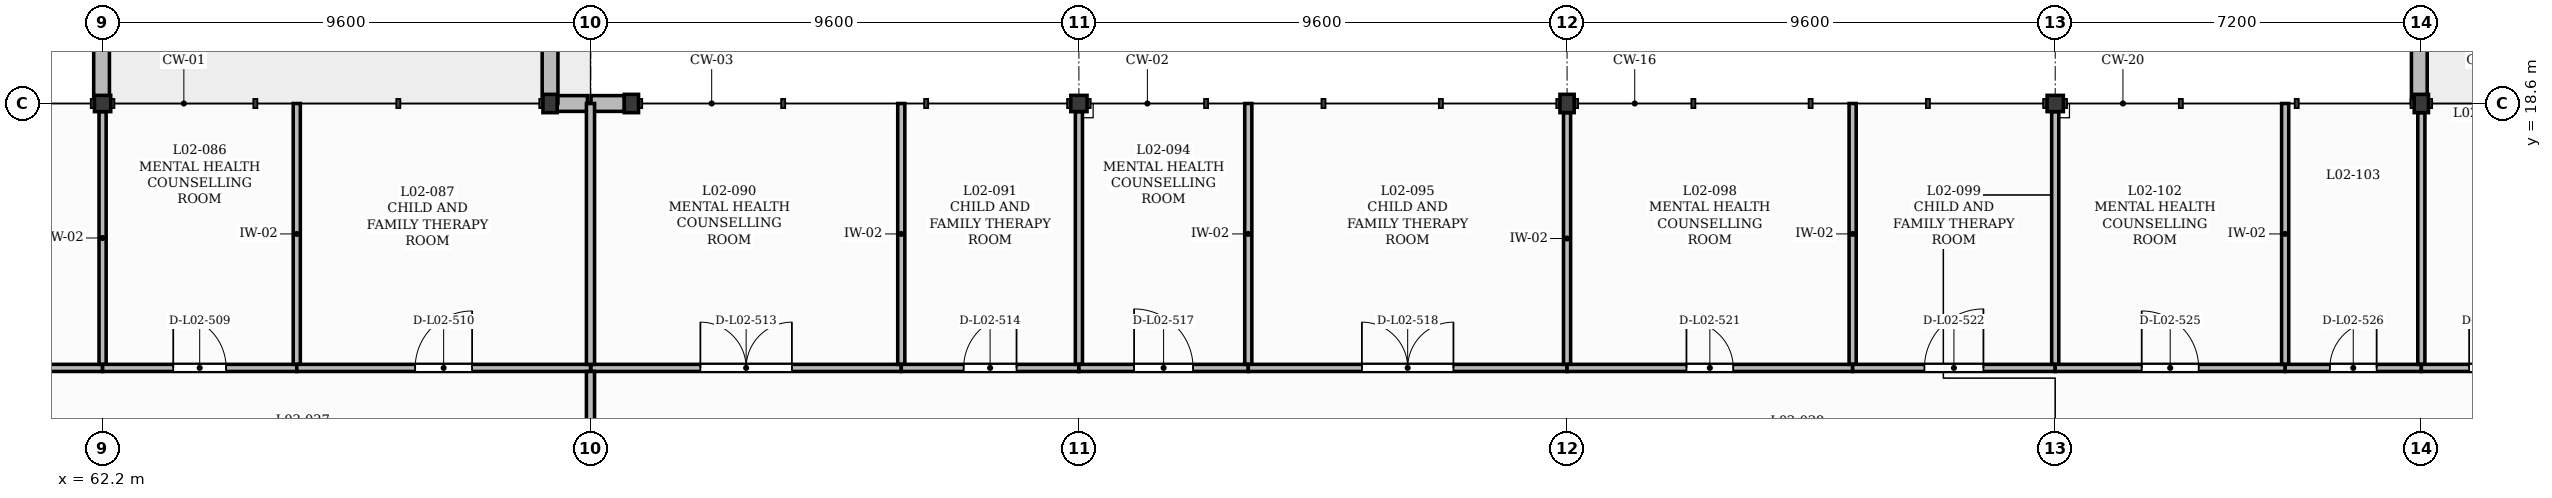
"""IFC4 building model, lengths in metres.
Left out: names, types, materials, properties, quantities, classifications, styles, units other than length and angle.
Written with IfcOpenShell. Run it as: python <this file> out.ifc"""

import sys

from ifc_helpers import new_model, si_unit, direction, frame, frame_2d, origin, origin_2d, place, context, subcontext, project, spatial, polyline, rectangle, outline, extrude, element, fill, save


model = new_model("IFC4")
c1 = context("Model", 3, precision=1e-05, world=origin(), true_north=direction((0.0, 1.0)))
c2 = subcontext(c1, "Body", "Model", "MODEL_VIEW")
j1 = project(units=[si_unit("LENGTHUNIT", "METRE"), si_unit("PLANEANGLEUNIT", "RADIAN")], contexts=[c1])
p1 = place(None, origin())
s1 = spatial("IfcSite", under=j1, at=p1, CompositionType="ELEMENT")
p2 = place(p1, origin())
s2 = spatial("IfcBuilding", under=s1, at=p2, CompositionType="ELEMENT")
p3 = place(p2, frame((0.0, 0.0, 9.0)))
s3 = spatial("IfcBuildingStorey", under=s2, at=p3, CompositionType="ELEMENT", Elevation=9.0)
p4 = place(p3, frame((72.6, 18.6, 0.0), z_axis=(0.0, 0.0, 1.0), x_axis=(1.0, 0.0, 0.0)))
e1 = element("IfcColumn", 1, at=p4, inside=s3, PredefinedType="COLUMN", context=c2, shape_type="SweptSolid", body=[
    extrude(rectangle(XDim=0.28, YDim=0.36, at=origin_2d()), origin(), (0.0, 0.0, 1.0), 3.99),
])
p5 = place(p3, frame((81.4, 18.6, 0.0), z_axis=(0.0, 0.0, 1.0), x_axis=(1.0, 0.0, 0.0)))
e2 = element("IfcColumn", 2, at=p5, inside=s3, PredefinedType="COLUMN", context=c2, shape_type="SweptSolid", body=[
    extrude(rectangle(XDim=0.32, YDim=0.32, at=origin_2d()), origin(), (0.0, 0.0, 1.0), 3.99),
])
p6 = place(p3, frame((91.0, 18.6, 0.0), z_axis=(0.0, 0.0, 1.0), x_axis=(1.0, 0.0, 0.0)))
e3 = element("IfcColumn", 3, at=p6, inside=s3, PredefinedType="COLUMN", context=c2, shape_type="SweptSolid", body=[
    extrude(rectangle(XDim=0.28, YDim=0.36, at=origin_2d()), origin(), (0.0, 0.0, 1.0), 3.99),
])
p7 = place(p3, frame((100.6, 18.6, 0.0), z_axis=(0.0, 0.0, 1.0), x_axis=(1.0, 0.0, 0.0)))
e4 = element("IfcColumn", 4, at=p7, inside=s3, PredefinedType="COLUMN", context=c2, shape_type="SweptSolid", body=[
    extrude(rectangle(XDim=0.32, YDim=0.32, at=origin_2d()), origin(), (0.0, 0.0, 1.0), 3.99),
])
p8 = place(p3, frame((107.8, 18.6, 0.0), z_axis=(0.0, 0.0, 1.0), x_axis=(1.0, 0.0, 0.0)))
e5 = element("IfcColumn", 5, at=p8, inside=s3, PredefinedType="COLUMN", context=c2, shape_type="SweptSolid", body=[
    extrude(rectangle(XDim=0.28, YDim=0.36, at=origin_2d()), origin(), (0.0, 0.0, 1.0), 3.98),
])
p9 = place(p3, frame((62.2, 18.6, 0.0), z_axis=(0.0, 0.0, 1.0), x_axis=(1.0, 0.0, 0.0)))
e6 = element("IfcColumn", 6, at=p9, inside=s3, PredefinedType="COLUMN", context=c2, shape_type="SweptSolid", body=[
    extrude(rectangle(XDim=0.32, YDim=0.32, at=origin_2d()), origin(), (0.0, 0.0, 1.0), 3.99),
])
p10 = place(p3, frame((71.0, 18.6, 0.0), z_axis=(0.0, 0.0, 1.0), x_axis=(1.0, 0.0, 0.0)))
e7 = element("IfcColumn", 7, at=p10, inside=s3, PredefinedType="COLUMN", context=c2, shape_type="SweptSolid", body=[
    extrude(rectangle(XDim=0.28, YDim=0.36, at=origin_2d()), origin(), (0.0, 0.0, 1.0), 3.99),
])
p11 = place(p3, frame((71.14, 18.6, 0.0), z_axis=(0.0, 0.0, 1.0), x_axis=(1.0, 0.0, 0.0)))
e8 = element("IfcWall", 8, at=p11, inside=s3, PredefinedType="SOLIDWALL", context=c2, shape_type="SweptSolid", body=[
    extrude(rectangle(XDim=0.595, YDim=0.31, at=frame_2d((0.298, 0.0))), origin(), (0.0, 0.0, 1.0), 3.99),
])
p12 = place(p3, frame((71.805, 18.6, 0.0), z_axis=(0.0, 0.0, 1.0), x_axis=(1.0, 0.0, 0.0)))
e9 = element("IfcWall", 9, at=p12, inside=s3, PredefinedType="SOLIDWALL", context=c2, shape_type="SweptSolid", body=[
    extrude(rectangle(XDim=0.655, YDim=0.31, at=frame_2d((0.328, 0.0))), origin(), (0.0, 0.0, 1.0), 3.99),
])
for number, where, z_axis, x_axis in (
    (10, (62.18, 18.6, 0.0), (0.0, 0.0, 1.0), (0.0, 1.0, 0.0)),
    (11, (71.0, 18.6, 0.0), (0.0, 0.0, 1.0), (0.0, 1.0, 0.0)),
):
    element("IfcWall", number, at=place(p3, frame(where, z_axis=z_axis, x_axis=x_axis)), inside=s3, PredefinedType="SOLIDWALL", context=c2, shape_type="SweptSolid", body=[
        extrude(outline(polyline([(0.0, 0.0), (8.6, 0.0), (8.6, 0.05), (4.3, 2.16), (0.0, 0.05), (0.0, 0.0)])), frame((0.0, 0.155, 0.0), z_axis=(0.0, -1.0, 0.0), x_axis=(1.0, 0.0, 0.0)), (0.0, 0.0, 1.0), 0.31),
    ])
p13 = place(p3, frame((107.76, 18.6, 0.0), z_axis=(0.0, 0.0, 1.0), x_axis=(0.0, 1.0, 0.0)))
e12 = element("IfcWall", 12, at=p13, inside=s3, PredefinedType="SOLIDWALL", context=c2, shape_type="SweptSolid", body=[
    extrude(outline(polyline([(0.0, 0.0), (8.6, 0.0), (8.6, 0.05), (4.3, 1.52), (0.0, 0.05), (0.0, 0.0)])), frame((0.0, 0.155, 0.0), z_axis=(0.0, -1.0, 0.0), x_axis=(1.0, 0.0, 0.0)), (0.0, 0.0, 1.0), 0.31),
])
p14 = place(p3, frame((55.0, 13.4, 0.0), z_axis=(0.0, 0.0, 1.0), x_axis=(1.0, 0.0, 0.0)))
e13 = element("IfcWall", 13, at=p14, inside=s3, PredefinedType="PARTITIONING", context=c2, shape_type="SweptSolid", body=[
    extrude(rectangle(XDim=7.2, YDim=0.14, at=frame_2d((3.6, 0.0))), origin(), (0.0, 0.0, 1.0), 3.96),
])
p15 = place(p14, frame((2.7, 0.0, 0.0)))
e14 = element("IfcOpeningElement", 14, at=p15, cuts=e13, PredefinedType="OPENING", context=c2, shape_type="SweptSolid", body=[
    extrude(rectangle(XDim=1.8, YDim=2.3, at=frame_2d((0.9, 1.15))), frame((0.0, 0.08, 0.0), z_axis=(0.0, -1.0, 0.0), x_axis=(1.0, 0.0, 0.0)), (0.0, 0.0, 1.0), 0.16),
])
p16 = place(p3, frame((62.2, 13.47, 0.0), z_axis=(0.0, 0.0, 1.0), x_axis=(0.0, 1.0, 0.0)))
e15 = element("IfcWall", 15, at=p16, inside=s3, PredefinedType="PARTITIONING", context=c2, shape_type="SweptSolid", body=[
    extrude(rectangle(XDim=4.97, YDim=0.14, at=frame_2d((2.485, 0.0))), origin(), (0.0, 0.0, 1.0), 3.47),
])
p17 = place(p3, frame((62.2, 13.4, 0.0), z_axis=(0.0, 0.0, 1.0), x_axis=(1.0, 0.0, 0.0)))
e16 = element("IfcWall", 16, at=p17, inside=s3, PredefinedType="PARTITIONING", context=c2, shape_type="SweptSolid", body=[
    extrude(rectangle(XDim=3.819, YDim=0.14, at=frame_2d((1.91, 0.0))), origin(), (0.0, 0.0, 1.0), 3.96),
])
p18 = place(p17, frame((1.389, 0.0, 0.0)))
e17 = element("IfcOpeningElement", 17, at=p18, cuts=e16, PredefinedType="OPENING", context=c2, shape_type="SweptSolid", body=[
    extrude(rectangle(XDim=1.04, YDim=2.1, at=frame_2d((0.52, 1.05))), frame((0.0, 0.08, 0.0), z_axis=(0.0, -1.0, 0.0), x_axis=(1.0, 0.0, 0.0)), (0.0, 0.0, 1.0), 0.16),
])
p19 = place(p3, frame((66.019, 13.47, 0.0), z_axis=(0.0, 0.0, 1.0), x_axis=(0.0, 1.0, 0.0)))
e18 = element("IfcWall", 18, at=p19, inside=s3, PredefinedType="PARTITIONING", context=c2, shape_type="SweptSolid", body=[
    extrude(rectangle(XDim=5.13, YDim=0.14, at=frame_2d((2.565, 0.0))), origin(), (0.0, 0.0, 1.0), 3.96),
])
p20 = place(p3, frame((66.019, 13.4, 0.0), z_axis=(0.0, 0.0, 1.0), x_axis=(1.0, 0.0, 0.0)))
e19 = element("IfcWall", 19, at=p20, inside=s3, PredefinedType="PARTITIONING", context=c2, shape_type="SweptSolid", body=[
    extrude(rectangle(XDim=5.776, YDim=0.14, at=frame_2d((2.888, 0.0))), origin(), (0.0, 0.0, 1.0), 3.96),
])
p21 = place(p20, frame((2.328, 0.0, 0.0)))
e20 = element("IfcOpeningElement", 20, at=p21, cuts=e19, PredefinedType="OPENING", context=c2, shape_type="SweptSolid", body=[
    extrude(rectangle(XDim=1.12, YDim=2.15, at=frame_2d((0.56, 1.075))), frame((0.0, 0.08, 0.0), z_axis=(0.0, -1.0, 0.0), x_axis=(1.0, 0.0, 0.0)), (0.0, 0.0, 1.0), 0.16),
])
p22 = place(p3, frame((71.805, 13.4, 0.0), z_axis=(0.0, 0.0, 1.0), x_axis=(1.0, 0.0, 0.0)))
e21 = element("IfcWall", 21, at=p22, inside=s3, PredefinedType="PARTITIONING", context=c2, shape_type="SweptSolid", body=[
    extrude(rectangle(XDim=6.102, YDim=0.14, at=frame_2d((3.051, 0.0))), origin(), (0.0, 0.0, 1.0), 3.96),
])
p23 = place(p22, frame((2.151, 0.0, 0.0)))
e22 = element("IfcOpeningElement", 22, at=p23, cuts=e21, PredefinedType="OPENING", context=c2, shape_type="SweptSolid", body=[
    extrude(rectangle(XDim=1.8, YDim=2.3, at=frame_2d((0.9, 1.15))), frame((0.0, 0.08, 0.0), z_axis=(0.0, -1.0, 0.0), x_axis=(1.0, 0.0, 0.0)), (0.0, 0.0, 1.0), 0.16),
])
p24 = place(p3, frame((77.907, 13.47, 0.0), z_axis=(0.0, 0.0, 1.0), x_axis=(0.0, 1.0, 0.0)))
e23 = element("IfcWall", 23, at=p24, inside=s3, PredefinedType="PARTITIONING", context=c2, shape_type="SweptSolid", body=[
    extrude(rectangle(XDim=5.13, YDim=0.14, at=frame_2d((2.565, 0.0))), origin(), (0.0, 0.0, 1.0), 3.96),
])
p25 = place(p3, frame((77.907, 13.4, 0.0), z_axis=(0.0, 0.0, 1.0), x_axis=(1.0, 0.0, 0.0)))
e24 = element("IfcWall", 24, at=p25, inside=s3, PredefinedType="PARTITIONING", context=c2, shape_type="SweptSolid", body=[
    extrude(rectangle(XDim=3.493, YDim=0.14, at=frame_2d((1.747, 0.0))), origin(), (0.0, 0.0, 1.0), 3.96),
])
p26 = place(p25, frame((1.227, 0.0, 0.0)))
e25 = element("IfcOpeningElement", 25, at=p26, cuts=e24, PredefinedType="OPENING", context=c2, shape_type="SweptSolid", body=[
    extrude(rectangle(XDim=1.04, YDim=2.1, at=frame_2d((0.52, 1.05))), frame((0.0, 0.08, 0.0), z_axis=(0.0, -1.0, 0.0), x_axis=(1.0, 0.0, 0.0)), (0.0, 0.0, 1.0), 0.16),
])
p27 = place(p3, frame((81.4, 13.47, 0.0), z_axis=(0.0, 0.0, 1.0), x_axis=(0.0, 1.0, 0.0)))
e26 = element("IfcWall", 26, at=p27, inside=s3, PredefinedType="PARTITIONING", context=c2, shape_type="SweptSolid", body=[
    extrude(rectangle(XDim=4.97, YDim=0.14, at=frame_2d((2.485, 0.0))), origin(), (0.0, 0.0, 1.0), 3.47),
])
p28 = place(p3, frame((81.4, 13.4, 0.0), z_axis=(0.0, 0.0, 1.0), x_axis=(1.0, 0.0, 0.0)))
e27 = element("IfcWall", 27, at=p28, inside=s3, PredefinedType="PARTITIONING", context=c2, shape_type="SweptSolid", body=[
    extrude(rectangle(XDim=3.331, YDim=0.14, at=frame_2d((1.666, 0.0))), origin(), (0.0, 0.0, 1.0), 3.96),
])
p29 = place(p28, frame((1.085, 0.0, 0.0)))
e28 = element("IfcOpeningElement", 28, at=p29, cuts=e27, PredefinedType="OPENING", context=c2, shape_type="SweptSolid", body=[
    extrude(rectangle(XDim=1.16, YDim=2.1, at=frame_2d((0.58, 1.05))), frame((0.0, 0.08, 0.0), z_axis=(0.0, -1.0, 0.0), x_axis=(1.0, 0.0, 0.0)), (0.0, 0.0, 1.0), 0.16),
])
p30 = place(p3, frame((84.731, 13.47, 0.0), z_axis=(0.0, 0.0, 1.0), x_axis=(0.0, 1.0, 0.0)))
e29 = element("IfcWall", 29, at=p30, inside=s3, PredefinedType="PARTITIONING", context=c2, shape_type="SweptSolid", body=[
    extrude(rectangle(XDim=5.13, YDim=0.14, at=frame_2d((2.565, 0.0))), origin(), (0.0, 0.0, 1.0), 3.96),
])
p31 = place(p3, frame((84.731, 13.4, 0.0), z_axis=(0.0, 0.0, 1.0), x_axis=(1.0, 0.0, 0.0)))
e30 = element("IfcWall", 30, at=p31, inside=s3, PredefinedType="PARTITIONING", context=c2, shape_type="SweptSolid", body=[
    extrude(rectangle(XDim=6.269, YDim=0.14, at=frame_2d((3.135, 0.0))), origin(), (0.0, 0.0, 1.0), 3.96),
])
p32 = place(p31, frame((2.235, 0.0, 0.0)))
e31 = element("IfcOpeningElement", 31, at=p32, cuts=e30, PredefinedType="OPENING", context=c2, shape_type="SweptSolid", body=[
    extrude(rectangle(XDim=1.8, YDim=2.3, at=frame_2d((0.9, 1.15))), frame((0.0, 0.08, 0.0), z_axis=(0.0, -1.0, 0.0), x_axis=(1.0, 0.0, 0.0)), (0.0, 0.0, 1.0), 0.16),
])
p33 = place(p3, frame((91.0, 13.47, 0.0), z_axis=(0.0, 0.0, 1.0), x_axis=(0.0, 1.0, 0.0)))
e32 = element("IfcWall", 32, at=p33, inside=s3, PredefinedType="PARTITIONING", context=c2, shape_type="SweptSolid", body=[
    extrude(rectangle(XDim=4.95, YDim=0.14, at=frame_2d((2.475, 0.0))), origin(), (0.0, 0.0, 1.0), 3.47),
])
p34 = place(p3, frame((91.0, 13.4, 0.0), z_axis=(0.0, 0.0, 1.0), x_axis=(1.0, 0.0, 0.0)))
e33 = element("IfcWall", 33, at=p34, inside=s3, PredefinedType="PARTITIONING", context=c2, shape_type="SweptSolid", body=[
    extrude(rectangle(XDim=5.616, YDim=0.14, at=frame_2d((2.808, 0.0))), origin(), (0.0, 0.0, 1.0), 3.96),
])
p35 = place(p34, frame((2.348, 0.0, 0.0)))
e34 = element("IfcOpeningElement", 34, at=p35, cuts=e33, PredefinedType="OPENING", context=c2, shape_type="SweptSolid", body=[
    extrude(rectangle(XDim=0.92, YDim=2.1, at=frame_2d((0.46, 1.05))), frame((0.0, 0.08, 0.0), z_axis=(0.0, -1.0, 0.0), x_axis=(1.0, 0.0, 0.0)), (0.0, 0.0, 1.0), 0.16),
])
p36 = place(p3, frame((96.616, 13.47, 0.0), z_axis=(0.0, 0.0, 1.0), x_axis=(0.0, 1.0, 0.0)))
e35 = element("IfcWall", 35, at=p36, inside=s3, PredefinedType="PARTITIONING", context=c2, shape_type="SweptSolid", body=[
    extrude(rectangle(XDim=5.13, YDim=0.14, at=frame_2d((2.565, 0.0))), origin(), (0.0, 0.0, 1.0), 3.96),
])
p37 = place(p3, frame((96.616, 13.4, 0.0), z_axis=(0.0, 0.0, 1.0), x_axis=(1.0, 0.0, 0.0)))
e36 = element("IfcWall", 36, at=p37, inside=s3, PredefinedType="PARTITIONING", context=c2, shape_type="SweptSolid", body=[
    extrude(rectangle(XDim=3.984, YDim=0.14, at=frame_2d((1.992, 0.0))), origin(), (0.0, 0.0, 1.0), 3.96),
])
p38 = place(p37, frame((1.412, 0.0, 0.0)))
e37 = element("IfcOpeningElement", 37, at=p38, cuts=e36, PredefinedType="OPENING", context=c2, shape_type="SweptSolid", body=[
    extrude(rectangle(XDim=1.16, YDim=2.1, at=frame_2d((0.58, 1.05))), frame((0.0, 0.08, 0.0), z_axis=(0.0, -1.0, 0.0), x_axis=(1.0, 0.0, 0.0)), (0.0, 0.0, 1.0), 0.16),
])
p39 = place(p3, frame((100.6, 13.47, 0.0), z_axis=(0.0, 0.0, 1.0), x_axis=(0.0, 1.0, 0.0)))
e38 = element("IfcWall", 38, at=p39, inside=s3, PredefinedType="PARTITIONING", context=c2, shape_type="SweptSolid", body=[
    extrude(rectangle(XDim=4.97, YDim=0.14, at=frame_2d((2.485, 0.0))), origin(), (0.0, 0.0, 1.0), 3.47),
])
p40 = place(p3, frame((100.6, 13.4, 0.0), z_axis=(0.0, 0.0, 1.0), x_axis=(1.0, 0.0, 0.0)))
e39 = element("IfcWall", 39, at=p40, inside=s3, PredefinedType="PARTITIONING", context=c2, shape_type="SweptSolid", body=[
    extrude(rectangle(XDim=4.522, YDim=0.14, at=frame_2d((2.261, 0.0))), origin(), (0.0, 0.0, 1.0), 3.96),
])
p41 = place(p40, frame((1.701, 0.0, 0.0)))
e40 = element("IfcOpeningElement", 40, at=p41, cuts=e39, PredefinedType="OPENING", context=c2, shape_type="SweptSolid", body=[
    extrude(rectangle(XDim=1.12, YDim=2.15, at=frame_2d((0.56, 1.075))), frame((0.0, 0.08, 0.0), z_axis=(0.0, -1.0, 0.0), x_axis=(1.0, 0.0, 0.0)), (0.0, 0.0, 1.0), 0.16),
])
p42 = place(p3, frame((105.122, 13.47, 0.0), z_axis=(0.0, 0.0, 1.0), x_axis=(0.0, 1.0, 0.0)))
e41 = element("IfcWall", 41, at=p42, inside=s3, PredefinedType="PARTITIONING", context=c2, shape_type="SweptSolid", body=[
    extrude(rectangle(XDim=5.13, YDim=0.14, at=frame_2d((2.565, 0.0))), origin(), (0.0, 0.0, 1.0), 3.96),
])
p43 = place(p3, frame((105.122, 13.4, 0.0), z_axis=(0.0, 0.0, 1.0), x_axis=(1.0, 0.0, 0.0)))
e42 = element("IfcWall", 42, at=p43, inside=s3, PredefinedType="PARTITIONING", context=c2, shape_type="SweptSolid", body=[
    extrude(rectangle(XDim=2.678, YDim=0.14, at=frame_2d((1.339, 0.0))), origin(), (0.0, 0.0, 1.0), 3.96),
])
p44 = place(p43, frame((0.879, 0.0, 0.0)))
e43 = element("IfcOpeningElement", 43, at=p44, cuts=e42, PredefinedType="OPENING", context=c2, shape_type="SweptSolid", body=[
    extrude(rectangle(XDim=0.92, YDim=2.1, at=frame_2d((0.46, 1.05))), frame((0.0, 0.08, 0.0), z_axis=(0.0, -1.0, 0.0), x_axis=(1.0, 0.0, 0.0)), (0.0, 0.0, 1.0), 0.16),
])
p45 = place(p3, frame((107.8, 13.47, 0.0), z_axis=(0.0, 0.0, 1.0), x_axis=(0.0, 1.0, 0.0)))
e44 = element("IfcWall", 44, at=p45, inside=s3, PredefinedType="PARTITIONING", context=c2, shape_type="SweptSolid", body=[
    extrude(rectangle(XDim=4.95, YDim=0.14, at=frame_2d((2.475, 0.0))), origin(), (0.0, 0.0, 1.0), 3.52),
])
p46 = place(p3, frame((107.8, 13.4, 0.0), z_axis=(0.0, 0.0, 1.0), x_axis=(1.0, 0.0, 0.0)))
e45 = element("IfcWall", 45, at=p46, inside=s3, PredefinedType="PARTITIONING", context=c2, shape_type="SweptSolid", body=[
    extrude(rectangle(XDim=2.8, YDim=0.14, at=frame_2d((1.4, 0.0))), origin(), (0.0, 0.0, 1.0), 3.96),
])
p47 = place(p46, frame((0.94, 0.0, 0.0)))
e46 = element("IfcOpeningElement", 46, at=p47, cuts=e45, PredefinedType="OPENING", context=c2, shape_type="SweptSolid", body=[
    extrude(rectangle(XDim=0.92, YDim=2.1, at=frame_2d((0.46, 1.05))), frame((0.0, 0.08, 0.0), z_axis=(0.0, -1.0, 0.0), x_axis=(1.0, 0.0, 0.0)), (0.0, 0.0, 1.0), 0.16),
])
p48 = place(p3, frame((71.795, 10.87, 0.0), z_axis=(0.0, 0.0, 1.0), x_axis=(0.0, 1.0, 0.0)))
e47 = element("IfcWall", 47, at=p48, inside=s3, PredefinedType="PARTITIONING", context=c2, shape_type="SweptSolid", body=[
    extrude(rectangle(XDim=2.46, YDim=0.16, at=frame_2d((1.23, 0.0))), origin(), (0.0, 0.0, 1.0), 3.96),
])
p49 = place(p3, frame((71.795, 13.47, 0.0), z_axis=(0.0, 0.0, 1.0), x_axis=(0.0, 1.0, 0.0)))
e48 = element("IfcWall", 48, at=p49, inside=s3, PredefinedType="PARTITIONING", context=c2, shape_type="SweptSolid", body=[
    extrude(rectangle(XDim=5.13, YDim=0.16, at=frame_2d((2.565, 0.0))), origin(), (0.0, 0.0, 1.0), 3.96),
])
p50 = place(p47, origin())
e49 = element("IfcDoor", 49, at=p50, inside=s3, OperationType="SINGLE_SWING_LEFT", PredefinedType="DOOR", context=c2, shape_type="SweptSolid", body=[
    extrude(rectangle(XDim=0.92, YDim=2.1, at=frame_2d((0.46, 1.05))), frame((0.0, 0.025, 0.0), z_axis=(0.0, -1.0, 0.0), x_axis=(1.0, 0.0, 0.0)), (0.0, 0.0, 1.0), 0.05),
])
fill(e46, e49)
p51 = place(p18, origin())
e50 = element("IfcDoor", 50, at=p51, inside=s3, OperationType="SINGLE_SWING_LEFT", PredefinedType="DOOR", context=c2, shape_type="SweptSolid", body=[
    extrude(rectangle(XDim=1.04, YDim=2.1, at=frame_2d((0.52, 1.05))), frame((0.0, 0.025, 0.0), z_axis=(0.0, -1.0, 0.0), x_axis=(1.0, 0.0, 0.0)), (0.0, 0.0, 1.0), 0.05),
])
fill(e17, e50)
p52 = place(p21, origin())
e51 = element("IfcDoor", 51, at=p52, inside=s3, OperationType="SINGLE_SWING_RIGHT", PredefinedType="DOOR", context=c2, shape_type="SweptSolid", body=[
    extrude(rectangle(XDim=1.12, YDim=2.15, at=frame_2d((0.56, 1.075))), frame((0.0, 0.025, 0.0), z_axis=(0.0, -1.0, 0.0), x_axis=(1.0, 0.0, 0.0)), (0.0, 0.0, 1.0), 0.05),
])
fill(e20, e51)
p53 = place(p23, origin())
e52 = element("IfcDoor", 52, at=p53, inside=s3, OperationType="DOUBLE_DOOR_SINGLE_SWING", PredefinedType="DOOR", context=c2, shape_type="SweptSolid", body=[
    extrude(rectangle(XDim=1.8, YDim=2.3, at=frame_2d((0.9, 1.15))), frame((0.0, 0.025, 0.0), z_axis=(0.0, -1.0, 0.0), x_axis=(1.0, 0.0, 0.0)), (0.0, 0.0, 1.0), 0.05),
])
fill(e22, e52)
p54 = place(p26, origin())
e53 = element("IfcDoor", 53, at=p54, inside=s3, OperationType="SINGLE_SWING_RIGHT", PredefinedType="DOOR", context=c2, shape_type="SweptSolid", body=[
    extrude(rectangle(XDim=1.04, YDim=2.1, at=frame_2d((0.52, 1.05))), frame((0.0, 0.025, 0.0), z_axis=(0.0, -1.0, 0.0), x_axis=(1.0, 0.0, 0.0)), (0.0, 0.0, 1.0), 0.05),
])
fill(e25, e53)
p55 = place(p29, origin())
e54 = element("IfcDoor", 54, at=p55, inside=s3, OperationType="SINGLE_SWING_LEFT", PredefinedType="DOOR", context=c2, shape_type="SweptSolid", body=[
    extrude(rectangle(XDim=1.16, YDim=2.1, at=frame_2d((0.58, 1.05))), frame((0.0, 0.025, 0.0), z_axis=(0.0, -1.0, 0.0), x_axis=(1.0, 0.0, 0.0)), (0.0, 0.0, 1.0), 0.05),
])
fill(e28, e54)
p56 = place(p32, origin())
e55 = element("IfcDoor", 55, at=p56, inside=s3, OperationType="DOUBLE_DOOR_SINGLE_SWING", PredefinedType="DOOR", context=c2, shape_type="SweptSolid", body=[
    extrude(rectangle(XDim=1.8, YDim=2.3, at=frame_2d((0.9, 1.15))), frame((0.0, 0.025, 0.0), z_axis=(0.0, -1.0, 0.0), x_axis=(1.0, 0.0, 0.0)), (0.0, 0.0, 1.0), 0.05),
])
fill(e31, e55)
p57 = place(p35, origin())
e56 = element("IfcDoor", 56, at=p57, inside=s3, OperationType="SINGLE_SWING_LEFT", PredefinedType="DOOR", context=c2, shape_type="SweptSolid", body=[
    extrude(rectangle(XDim=0.92, YDim=2.1, at=frame_2d((0.46, 1.05))), frame((0.0, 0.025, 0.0), z_axis=(0.0, -1.0, 0.0), x_axis=(1.0, 0.0, 0.0)), (0.0, 0.0, 1.0), 0.05),
])
fill(e34, e56)
p58 = place(p38, origin())
e57 = element("IfcDoor", 57, at=p58, inside=s3, OperationType="SINGLE_SWING_RIGHT", PredefinedType="DOOR", context=c2, shape_type="SweptSolid", body=[
    extrude(rectangle(XDim=1.16, YDim=2.1, at=frame_2d((0.58, 1.05))), frame((0.0, 0.025, 0.0), z_axis=(0.0, -1.0, 0.0), x_axis=(1.0, 0.0, 0.0)), (0.0, 0.0, 1.0), 0.05),
])
fill(e37, e57)
p59 = place(p41, origin())
e58 = element("IfcDoor", 58, at=p59, inside=s3, OperationType="SINGLE_SWING_LEFT", PredefinedType="DOOR", context=c2, shape_type="SweptSolid", body=[
    extrude(rectangle(XDim=1.12, YDim=2.15, at=frame_2d((0.56, 1.075))), frame((0.0, 0.025, 0.0), z_axis=(0.0, -1.0, 0.0), x_axis=(1.0, 0.0, 0.0)), (0.0, 0.0, 1.0), 0.05),
])
fill(e40, e58)
p60 = place(p44, origin())
e59 = element("IfcDoor", 59, at=p60, inside=s3, OperationType="SINGLE_SWING_RIGHT", PredefinedType="DOOR", context=c2, shape_type="SweptSolid", body=[
    extrude(rectangle(XDim=0.92, YDim=2.1, at=frame_2d((0.46, 1.05))), frame((0.0, 0.025, 0.0), z_axis=(0.0, -1.0, 0.0), x_axis=(1.0, 0.0, 0.0)), (0.0, 0.0, 1.0), 0.05),
])
fill(e43, e59)
save(model, sys.argv[1])
